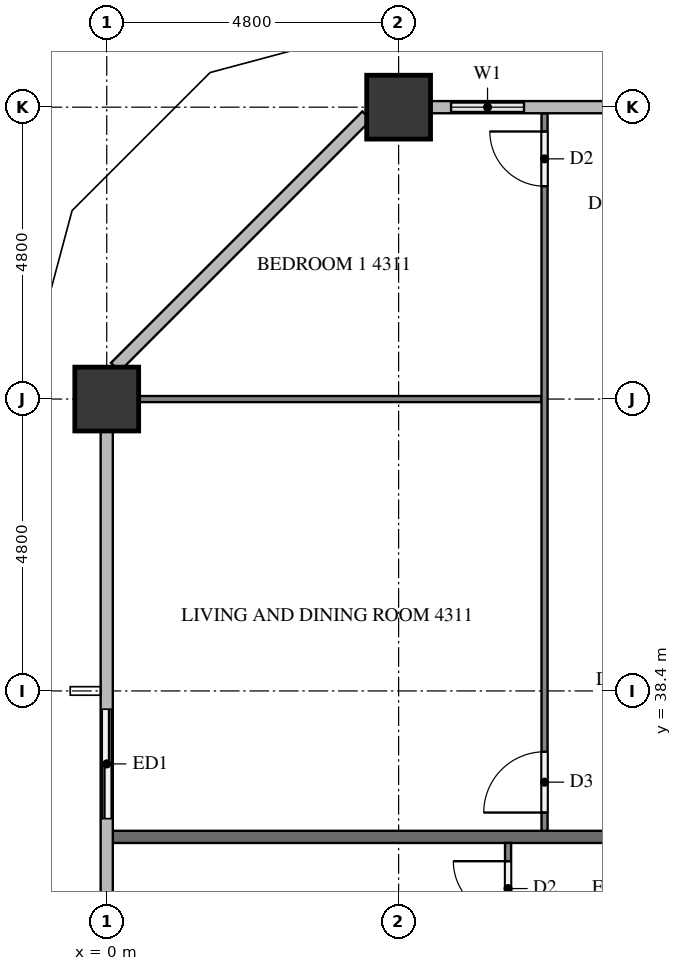
"""IFC4 building model, lengths in metres.
Left out: names, types, materials, properties, quantities, classifications, styles, units other than length and angle.
Written with IfcOpenShell. Run it as: python <this file> out.ifc"""

import sys

from ifc_helpers import new_model, si_unit, direction, frame, frame_2d, origin, origin_2d, place, context, subcontext, project, spatial, rectangle, extrude, element, fill, save


model = new_model("IFC4")
c1 = context("Model", 3, precision=1e-05, world=origin(), true_north=direction((0.0, 1.0)))
c2 = subcontext(c1, "Body", "Model", "MODEL_VIEW")
j1 = project(units=[si_unit("LENGTHUNIT", "METRE"), si_unit("PLANEANGLEUNIT", "RADIAN")], contexts=[c1])
p1 = place(None, origin())
s1 = spatial("IfcSite", under=j1, at=p1, CompositionType="ELEMENT")
p2 = place(p1, origin())
s2 = spatial("IfcBuilding", under=s1, at=p2, CompositionType="ELEMENT")
p3 = place(p2, frame((0.0, 0.0, 166.5)))
s3 = spatial("IfcBuildingStorey", under=s2, at=p3, CompositionType="ELEMENT", Elevation=166.5)
for number, where, z_axis, x_axis in (
    (1, (4.8, 48.0, 0.0), (0.0, 0.0, 1.0), (1.0, 0.0, 0.0)),
    (2, (0.0, 43.2, 0.0), (0.0, 0.0, 1.0), (1.0, 0.0, 0.0)),
):
    element("IfcColumn", number, at=place(p3, frame(where, z_axis=z_axis, x_axis=x_axis)), inside=s3, PredefinedType="COLUMN", context=c2, shape_type="SweptSolid", body=[
        extrude(rectangle(XDim=1.05, YDim=1.05, at=origin_2d()), origin(), (0.0, 0.0, 1.0), 3.2),
    ])
p4 = place(p3, frame((7.2, 48.0, 0.0), z_axis=(0.0, 0.0, 1.0), x_axis=(-1.0, 0.0, 0.0)))
e3 = element("IfcWall", 3, at=p4, inside=s3, PredefinedType="SOLIDWALL", context=c2, shape_type="SweptSolid", body=[
    extrude(rectangle(XDim=1.875, YDim=0.15, at=frame_2d((0.938, 0.0))), origin(), (0.0, 0.0, 1.0), 3.2),
])
p5 = place(p4, frame((0.337, 0.0, 0.9)))
e4 = element("IfcOpeningElement", 4, at=p5, cuts=e3, PredefinedType="OPENING", context=c2, shape_type="SweptSolid", body=[
    extrude(rectangle(XDim=1.2, YDim=1.4, at=frame_2d((0.6, 0.7))), frame((0.0, 0.085, 0.0), z_axis=(0.0, -1.0, 0.0), x_axis=(1.0, 0.0, 0.0)), (0.0, 0.0, 1.0), 0.17),
])
p6 = place(p3, frame((0.0, 38.4, 0.0), z_axis=(0.0, 0.0, 1.0), x_axis=(0.0, -1.0, 0.0)))
e5 = element("IfcWall", 5, at=p6, inside=s3, PredefinedType="SOLIDWALL", context=c2, shape_type="SweptSolid", body=[
    extrude(rectangle(XDim=2.4, YDim=0.15, at=frame_2d((1.2, 0.0))), origin(), (0.0, 0.0, 1.0), 3.2),
])
p7 = place(p6, frame((0.3, 0.0, 0.0)))
e6 = element("IfcOpeningElement", 6, at=p7, cuts=e5, PredefinedType="OPENING", context=c2, shape_type="SweptSolid", body=[
    extrude(rectangle(XDim=1.8, YDim=2.4, at=frame_2d((0.9, 1.2))), frame((0.0, 0.085, 0.0), z_axis=(0.0, -1.0, 0.0), x_axis=(1.0, 0.0, 0.0)), (0.0, 0.0, 1.0), 0.17),
])
p8 = place(p3, frame((0.1, 36.0, 0.0), z_axis=(0.0, 0.0, 1.0), x_axis=(1.0, 0.0, 0.0)))
e7 = element("IfcWall", 7, at=p8, inside=s3, PredefinedType="PARTITIONING", context=c2, shape_type="SweptSolid", body=[
    extrude(rectangle(XDim=11.8, YDim=0.2, at=frame_2d((5.9, 0.0))), origin(), (0.0, 0.0, 1.0), 3.2),
])
p9 = place(p3, frame((7.15, 43.2, 0.0), z_axis=(0.0, 0.0, 1.0), x_axis=(-1.0, 0.0, 0.0)))
e8 = element("IfcWall", 8, at=p9, inside=s3, PredefinedType="PARTITIONING", context=c2, shape_type="SweptSolid", body=[
    extrude(rectangle(XDim=6.625, YDim=0.1, at=frame_2d((3.312, 0.0))), origin(), (0.0, 0.0, 1.0), 3.2),
])
p10 = place(p3, frame((7.2, 36.1, 0.0), z_axis=(0.0, 0.0, 1.0), x_axis=(0.0, 1.0, 0.0)))
e9 = element("IfcWall", 9, at=p10, inside=s3, PredefinedType="PARTITIONING", context=c2, shape_type="SweptSolid", body=[
    extrude(rectangle(XDim=11.8, YDim=0.1, at=frame_2d((5.9, 0.0))), origin(), (0.0, 0.0, 1.0), 3.2),
])
p11 = place(p10, frame((0.3, 0.0, 0.0)))
e10 = element("IfcOpeningElement", 10, at=p11, cuts=e9, PredefinedType="OPENING", context=c2, shape_type="SweptSolid", body=[
    extrude(rectangle(XDim=1.0, YDim=2.1, at=frame_2d((0.5, 1.05))), frame((0.0, 0.06, 0.0), z_axis=(0.0, -1.0, 0.0), x_axis=(1.0, 0.0, 0.0)), (0.0, 0.0, 1.0), 0.12),
])
p12 = place(p10, frame((10.6, 0.0, 0.0)))
e11 = element("IfcOpeningElement", 11, at=p12, cuts=e9, PredefinedType="OPENING", context=c2, shape_type="SweptSolid", body=[
    extrude(rectangle(XDim=0.9, YDim=2.1, at=frame_2d((0.45, 1.05))), frame((0.0, 0.06, 0.0), z_axis=(0.0, -1.0, 0.0), x_axis=(1.0, 0.0, 0.0)), (0.0, 0.0, 1.0), 0.12),
])
p13 = place(p3, frame((6.6, 26.5, 0.0), z_axis=(0.0, 0.0, 1.0), x_axis=(0.0, 1.0, 0.0)))
e12 = element("IfcWall", 12, at=p13, inside=s3, PredefinedType="PARTITIONING", context=c2, shape_type="SweptSolid", body=[
    extrude(rectangle(XDim=9.4, YDim=0.1, at=frame_2d((4.7, 0.0))), origin(), (0.0, 0.0, 1.0), 3.2),
])
p14 = place(p13, frame((8.2, 0.0, 0.0)))
e13 = element("IfcOpeningElement", 13, at=p14, cuts=e12, PredefinedType="OPENING", context=c2, shape_type="SweptSolid", body=[
    extrude(rectangle(XDim=0.9, YDim=2.1, at=frame_2d((0.45, 1.05))), frame((0.0, 0.06, 0.0), z_axis=(0.0, -1.0, 0.0), x_axis=(1.0, 0.0, 0.0)), (0.0, 0.0, 1.0), 0.12),
])
p15 = place(p13, frame((0.3, 0.0, 0.0)))
e14 = element("IfcOpeningElement", 14, at=p15, cuts=e12, PredefinedType="OPENING", context=c2, shape_type="SweptSolid", body=[
    extrude(rectangle(XDim=1.0, YDim=2.1, at=frame_2d((0.5, 1.05))), frame((0.0, 0.06, 0.0), z_axis=(0.0, -1.0, 0.0), x_axis=(1.0, 0.0, 0.0)), (0.0, 0.0, 1.0), 0.12),
])
p16 = place(p5, origin())
e15 = element("IfcWindow", 15, at=p16, inside=s3, PartitioningType="SINGLE_PANEL", PredefinedType="WINDOW", context=c2, shape_type="SweptSolid", body=[
    extrude(rectangle(XDim=1.2, YDim=1.4, at=frame_2d((0.6, 0.7))), frame((0.0, 0.03, 0.0), z_axis=(0.0, -1.0, 0.0), x_axis=(1.0, 0.0, 0.0)), (0.0, 0.0, 1.0), 0.06),
])
fill(e4, e15)
p17 = place(p7, origin())
e16 = element("IfcDoor", 16, at=p17, inside=s3, OperationType="SLIDING_TO_LEFT", PredefinedType="DOOR", context=c2, shape_type="SweptSolid", body=[
    extrude(rectangle(XDim=1.8, YDim=2.4, at=frame_2d((0.9, 1.2))), frame((0.0, 0.025, 0.0), z_axis=(0.0, -1.0, 0.0), x_axis=(1.0, 0.0, 0.0)), (0.0, 0.0, 1.0), 0.05),
])
fill(e6, e16)
p18 = place(p11, origin())
e17 = element("IfcDoor", 17, at=p18, inside=s3, OperationType="SINGLE_SWING_LEFT", PredefinedType="DOOR", context=c2, shape_type="SweptSolid", body=[
    extrude(rectangle(XDim=1.0, YDim=2.1, at=frame_2d((0.5, 1.05))), frame((0.0, 0.025, 0.0), z_axis=(0.0, -1.0, 0.0), x_axis=(1.0, 0.0, 0.0)), (0.0, 0.0, 1.0), 0.05),
])
fill(e10, e17)
p19 = place(p12, origin())
e18 = element("IfcDoor", 18, at=p19, inside=s3, OperationType="SINGLE_SWING_RIGHT", PredefinedType="DOOR", context=c2, shape_type="SweptSolid", body=[
    extrude(rectangle(XDim=0.9, YDim=2.1, at=frame_2d((0.45, 1.05))), frame((0.0, 0.025, 0.0), z_axis=(0.0, -1.0, 0.0), x_axis=(1.0, 0.0, 0.0)), (0.0, 0.0, 1.0), 0.05),
])
fill(e11, e18)
p20 = place(p14, origin())
e19 = element("IfcDoor", 19, at=p20, inside=s3, OperationType="SINGLE_SWING_RIGHT", PredefinedType="DOOR", context=c2, shape_type="SweptSolid", body=[
    extrude(rectangle(XDim=0.9, YDim=2.1, at=frame_2d((0.45, 1.05))), frame((0.0, 0.025, 0.0), z_axis=(0.0, -1.0, 0.0), x_axis=(1.0, 0.0, 0.0)), (0.0, 0.0, 1.0), 0.05),
])
fill(e13, e19)
save(model, sys.argv[1])
